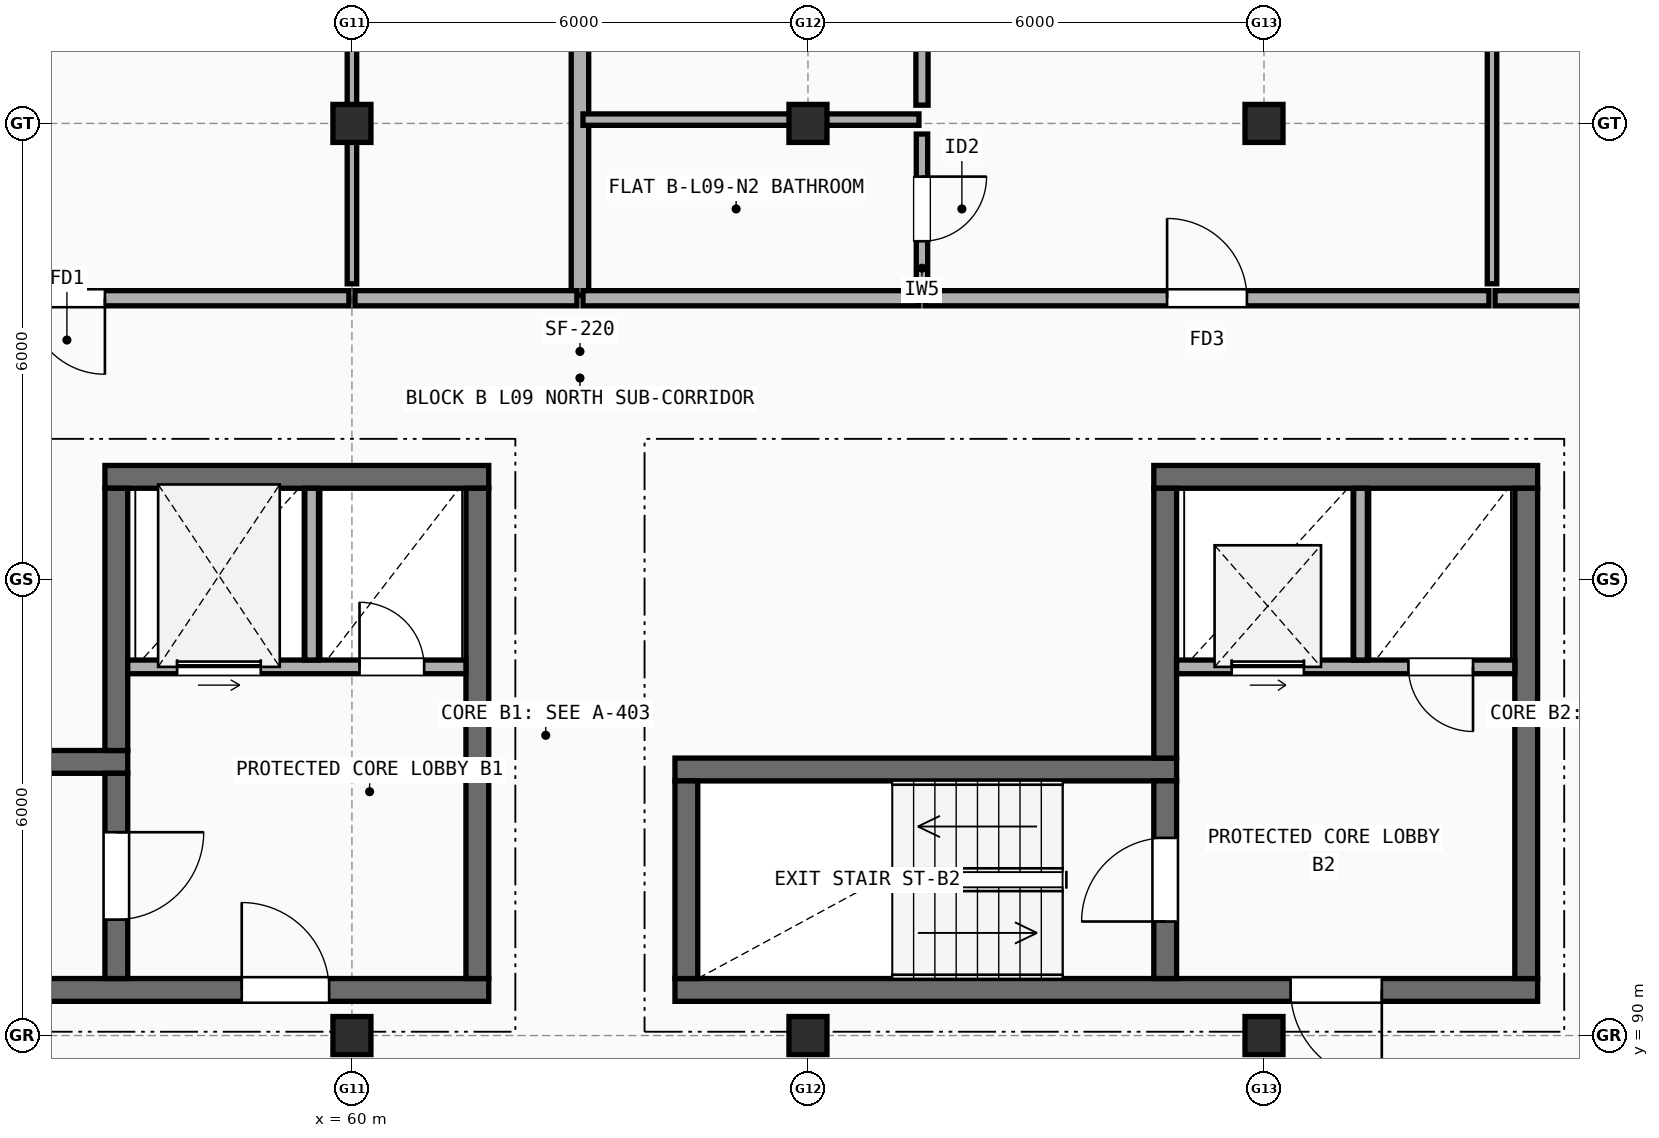
"""IFC4 building model, lengths in metres.
Left out: names, types, materials, properties, quantities, classifications, styles, units other than length and angle.
Written with IfcOpenShell. Run it as: python <this file> out.ifc"""

import sys

from ifc_helpers import new_model, si_unit, direction, frame, frame_2d, origin, origin_2d, place, context, subcontext, project, spatial, rectangle, extrude, element, fill, save


model = new_model("IFC4")
c1 = context("Model", 3, precision=1e-05, world=origin(), true_north=direction((0.0, 1.0)))
c2 = subcontext(c1, "Body", "Model", "MODEL_VIEW")
j1 = project(units=[si_unit("LENGTHUNIT", "METRE"), si_unit("PLANEANGLEUNIT", "RADIAN")], contexts=[c1])
p1 = place(None, origin())
s1 = spatial("IfcSite", under=j1, at=p1, CompositionType="ELEMENT")
p2 = place(p1, origin())
s2 = spatial("IfcBuilding", under=s1, at=p2, CompositionType="ELEMENT")
p3 = place(p2, frame((0.0, 0.0, 30.1)))
s3 = spatial("IfcBuildingStorey", under=s2, at=p3, CompositionType="ELEMENT", Elevation=30.1)
for number, where, z_axis, x_axis in (
    (1, (60.0, 90.0, 0.0), (0.0, 0.0, 1.0), (1.0, 0.0, 0.0)),
    (2, (60.0, 102.0, 0.0), (0.0, 0.0, 1.0), (1.0, 0.0, 0.0)),
    (3, (66.0, 90.0, 0.0), (0.0, 0.0, 1.0), (1.0, 0.0, 0.0)),
    (4, (66.0, 102.0, 0.0), (0.0, 0.0, 1.0), (1.0, 0.0, 0.0)),
    (5, (72.0, 90.0, 0.0), (0.0, 0.0, 1.0), (1.0, 0.0, 0.0)),
    (6, (72.0, 102.0, 0.0), (0.0, 0.0, 1.0), (1.0, 0.0, 0.0)),
):
    element("IfcColumn", number, at=place(p3, frame(where, z_axis=z_axis, x_axis=x_axis)), inside=s3, PredefinedType="COLUMN", context=c2, shape_type="SweptSolid", body=[
        extrude(rectangle(XDim=0.5, YDim=0.5, at=origin_2d()), origin(), (0.0, 0.0, 1.0), 2.985),
    ])
p4 = place(p3, frame((50.45, 90.6, 0.0), z_axis=(0.0, 0.0, 1.0), x_axis=(1.0, 0.0, 0.0)))
e7 = element("IfcWall", 7, at=p4, inside=s3, PredefinedType="SHEAR", context=c2, shape_type="SweptSolid", body=[
    extrude(rectangle(XDim=11.35, YDim=0.3, at=frame_2d((5.675, 0.0))), origin(), (0.0, 0.0, 1.0), 2.985),
])
p5 = place(p4, frame((8.1, 0.0, 0.0)))
e8 = element("IfcOpeningElement", 8, at=p5, cuts=e7, PredefinedType="OPENING", context=c2, shape_type="SweptSolid", body=[
    extrude(rectangle(XDim=1.15, YDim=2.15, at=frame_2d((0.575, 1.075))), frame((0.0, 0.16, 0.0), z_axis=(0.0, -1.0, 0.0), x_axis=(1.0, 0.0, 0.0)), (0.0, 0.0, 1.0), 0.32),
])
p6 = place(p3, frame((57.05, 93.6, 0.0), z_axis=(0.0, 0.0, 1.0), x_axis=(-1.0, 0.0, 0.0)))
e9 = element("IfcWall", 9, at=p6, inside=s3, PredefinedType="SHEAR", context=c2, shape_type="SweptSolid", body=[
    extrude(rectangle(XDim=6.6, YDim=0.3, at=frame_2d((3.3, 0.0))), origin(), (0.0, 0.0, 1.0), 2.985),
])
p7 = place(p3, frame((56.9, 90.75, 0.0), z_axis=(0.0, 0.0, 1.0), x_axis=(0.0, 1.0, 0.0)))
e10 = element("IfcWall", 10, at=p7, inside=s3, PredefinedType="SHEAR", context=c2, shape_type="SweptSolid", body=[
    extrude(rectangle(XDim=2.7, YDim=0.3, at=frame_2d((1.35, 0.0))), origin(), (0.0, 0.0, 1.0), 2.985),
])
p8 = place(p7, frame((0.775, 0.0, 0.0)))
e11 = element("IfcOpeningElement", 11, at=p8, cuts=e10, PredefinedType="OPENING", context=c2, shape_type="SweptSolid", body=[
    extrude(rectangle(XDim=1.15, YDim=2.15, at=frame_2d((0.575, 1.075))), frame((0.0, 0.16, 0.0), z_axis=(0.0, -1.0, 0.0), x_axis=(1.0, 0.0, 0.0)), (0.0, 0.0, 1.0), 0.32),
])
p9 = place(p3, frame((61.8, 97.35, 0.0), z_axis=(0.0, 0.0, 1.0), x_axis=(-1.0, 0.0, 0.0)))
e12 = element("IfcWall", 12, at=p9, inside=s3, PredefinedType="SHEAR", context=c2, shape_type="SweptSolid", body=[
    extrude(rectangle(XDim=5.05, YDim=0.3, at=frame_2d((2.525, 0.0))), origin(), (0.0, 0.0, 1.0), 2.985),
])
p10 = place(p3, frame((61.65, 90.75, 0.0), z_axis=(0.0, 0.0, 1.0), x_axis=(0.0, 1.0, 0.0)))
e13 = element("IfcWall", 13, at=p10, inside=s3, PredefinedType="SHEAR", context=c2, shape_type="SweptSolid", body=[
    extrude(rectangle(XDim=6.45, YDim=0.3, at=frame_2d((3.225, 0.0))), origin(), (0.0, 0.0, 1.0), 2.985),
])
p11 = place(p3, frame((56.9, 93.75, 0.0), z_axis=(0.0, 0.0, 1.0), x_axis=(0.0, 1.0, 0.0)))
e14 = element("IfcWall", 14, at=p11, inside=s3, PredefinedType="SHEAR", context=c2, shape_type="SweptSolid", body=[
    extrude(rectangle(XDim=3.45, YDim=0.3, at=frame_2d((1.725, 0.0))), origin(), (0.0, 0.0, 1.0), 2.985),
])
p12 = place(p3, frame((57.05, 94.85, 0.0), z_axis=(0.0, 0.0, 1.0), x_axis=(1.0, 0.0, 0.0)))
e15 = element("IfcWall", 15, at=p12, inside=s3, PredefinedType="SOLIDWALL", context=c2, shape_type="SweptSolid", body=[
    extrude(rectangle(XDim=4.45, YDim=0.18, at=frame_2d((2.225, 0.0))), origin(), (0.0, 0.0, 1.0), 2.985),
])
p13 = place(p12, frame((0.65, 0.0, 0.0)))
e16 = element("IfcOpeningElement", 16, at=p13, cuts=e15, PredefinedType="OPENING", context=c2, shape_type="SweptSolid", body=[
    extrude(rectangle(XDim=1.1, YDim=2.15, at=frame_2d((0.55, 1.075))), frame((0.0, 0.1, 0.0), z_axis=(0.0, -1.0, 0.0), x_axis=(1.0, 0.0, 0.0)), (0.0, 0.0, 1.0), 0.2),
])
p14 = place(p12, frame((3.05, 0.0, 0.0)))
e17 = element("IfcOpeningElement", 17, at=p14, cuts=e15, PredefinedType="OPENING", context=c2, shape_type="SweptSolid", body=[
    extrude(rectangle(XDim=0.85, YDim=2.1, at=frame_2d((0.425, 1.05))), frame((0.0, 0.1, 0.0), z_axis=(0.0, -1.0, 0.0), x_axis=(1.0, 0.0, 0.0)), (0.0, 0.0, 1.0), 0.2),
])
p15 = place(p3, frame((59.47, 94.94, 0.0), z_axis=(0.0, 0.0, 1.0), x_axis=(0.0, 1.0, 0.0)))
e18 = element("IfcWall", 18, at=p15, inside=s3, PredefinedType="SOLIDWALL", context=c2, shape_type="SweptSolid", body=[
    extrude(rectangle(XDim=2.26, YDim=0.18, at=frame_2d((1.13, 0.0))), origin(), (0.0, 0.0, 1.0), 2.985),
])
p16 = place(p3, frame((64.25, 90.6, 0.0), z_axis=(0.0, 0.0, 1.0), x_axis=(1.0, 0.0, 0.0)))
e19 = element("IfcWall", 19, at=p16, inside=s3, PredefinedType="SHEAR", context=c2, shape_type="SweptSolid", body=[
    extrude(rectangle(XDim=11.35, YDim=0.3, at=frame_2d((5.675, 0.0))), origin(), (0.0, 0.0, 1.0), 2.985),
])
p17 = place(p16, frame((8.1, 0.0, 0.0)))
e20 = element("IfcOpeningElement", 20, at=p17, cuts=e19, PredefinedType="OPENING", context=c2, shape_type="SweptSolid", body=[
    extrude(rectangle(XDim=1.2, YDim=2.15, at=frame_2d((0.6, 1.075))), frame((0.0, 0.16, 0.0), z_axis=(0.0, -1.0, 0.0), x_axis=(1.0, 0.0, 0.0)), (0.0, 0.0, 1.0), 0.32),
])
p18 = place(p3, frame((70.85, 93.5, 0.0), z_axis=(0.0, 0.0, 1.0), x_axis=(-1.0, 0.0, 0.0)))
e21 = element("IfcWall", 21, at=p18, inside=s3, PredefinedType="SHEAR", context=c2, shape_type="SweptSolid", body=[
    extrude(rectangle(XDim=6.6, YDim=0.3, at=frame_2d((3.3, 0.0))), origin(), (0.0, 0.0, 1.0), 2.985),
])
p19 = place(p3, frame((64.4, 93.35, 0.0), z_axis=(0.0, 0.0, 1.0), x_axis=(0.0, -1.0, 0.0)))
e22 = element("IfcWall", 22, at=p19, inside=s3, PredefinedType="SHEAR", context=c2, shape_type="SweptSolid", body=[
    extrude(rectangle(XDim=2.6, YDim=0.3, at=frame_2d((1.3, 0.0))), origin(), (0.0, 0.0, 1.0), 2.985),
])
p20 = place(p3, frame((70.7, 90.75, 0.0), z_axis=(0.0, 0.0, 1.0), x_axis=(0.0, 1.0, 0.0)))
e23 = element("IfcWall", 23, at=p20, inside=s3, PredefinedType="SHEAR", context=c2, shape_type="SweptSolid", body=[
    extrude(rectangle(XDim=2.6, YDim=0.3, at=frame_2d((1.3, 0.0))), origin(), (0.0, 0.0, 1.0), 2.985),
])
p21 = place(p20, frame((0.75, 0.0, 0.0)))
e24 = element("IfcOpeningElement", 24, at=p21, cuts=e23, PredefinedType="OPENING", context=c2, shape_type="SweptSolid", body=[
    extrude(rectangle(XDim=1.1, YDim=2.15, at=frame_2d((0.55, 1.075))), frame((0.0, 0.16, 0.0), z_axis=(0.0, -1.0, 0.0), x_axis=(1.0, 0.0, 0.0)), (0.0, 0.0, 1.0), 0.32),
])
p22 = place(p3, frame((75.6, 97.35, 0.0), z_axis=(0.0, 0.0, 1.0), x_axis=(-1.0, 0.0, 0.0)))
e25 = element("IfcWall", 25, at=p22, inside=s3, PredefinedType="SHEAR", context=c2, shape_type="SweptSolid", body=[
    extrude(rectangle(XDim=5.05, YDim=0.3, at=frame_2d((2.525, 0.0))), origin(), (0.0, 0.0, 1.0), 2.985),
])
p23 = place(p3, frame((75.45, 90.75, 0.0), z_axis=(0.0, 0.0, 1.0), x_axis=(0.0, 1.0, 0.0)))
e26 = element("IfcWall", 26, at=p23, inside=s3, PredefinedType="SHEAR", context=c2, shape_type="SweptSolid", body=[
    extrude(rectangle(XDim=6.45, YDim=0.3, at=frame_2d((3.225, 0.0))), origin(), (0.0, 0.0, 1.0), 2.985),
])
p24 = place(p3, frame((70.7, 93.65, 0.0), z_axis=(0.0, 0.0, 1.0), x_axis=(0.0, 1.0, 0.0)))
e27 = element("IfcWall", 27, at=p24, inside=s3, PredefinedType="SHEAR", context=c2, shape_type="SweptSolid", body=[
    extrude(rectangle(XDim=3.55, YDim=0.3, at=frame_2d((1.775, 0.0))), origin(), (0.0, 0.0, 1.0), 2.985),
])
p25 = place(p3, frame((70.85, 94.85, 0.0), z_axis=(0.0, 0.0, 1.0), x_axis=(1.0, 0.0, 0.0)))
e28 = element("IfcWall", 28, at=p25, inside=s3, PredefinedType="SOLIDWALL", context=c2, shape_type="SweptSolid", body=[
    extrude(rectangle(XDim=4.45, YDim=0.18, at=frame_2d((2.225, 0.0))), origin(), (0.0, 0.0, 1.0), 2.985),
])
p26 = place(p25, frame((0.725, 0.0, 0.0)))
e29 = element("IfcOpeningElement", 29, at=p26, cuts=e28, PredefinedType="OPENING", context=c2, shape_type="SweptSolid", body=[
    extrude(rectangle(XDim=0.95, YDim=2.15, at=frame_2d((0.475, 1.075))), frame((0.0, 0.1, 0.0), z_axis=(0.0, -1.0, 0.0), x_axis=(1.0, 0.0, 0.0)), (0.0, 0.0, 1.0), 0.2),
])
p27 = place(p25, frame((3.05, 0.0, 0.0)))
e30 = element("IfcOpeningElement", 30, at=p27, cuts=e28, PredefinedType="OPENING", context=c2, shape_type="SweptSolid", body=[
    extrude(rectangle(XDim=0.85, YDim=2.1, at=frame_2d((0.425, 1.05))), frame((0.0, 0.1, 0.0), z_axis=(0.0, -1.0, 0.0), x_axis=(1.0, 0.0, 0.0)), (0.0, 0.0, 1.0), 0.2),
])
p28 = place(p3, frame((73.27, 94.94, 0.0), z_axis=(0.0, 0.0, 1.0), x_axis=(0.0, 1.0, 0.0)))
e31 = element("IfcWall", 31, at=p28, inside=s3, PredefinedType="SOLIDWALL", context=c2, shape_type="SweptSolid", body=[
    extrude(rectangle(XDim=2.26, YDim=0.18, at=frame_2d((1.13, 0.0))), origin(), (0.0, 0.0, 1.0), 2.985),
])
p29 = place(p3, frame((63.0, 99.74, 0.0), z_axis=(0.0, 0.0, 1.0), x_axis=(0.0, 1.0, 0.0)))
e32 = element("IfcWall", 32, at=p29, inside=s3, PredefinedType="SOLIDWALL", context=c2, shape_type="SweptSolid", body=[
    extrude(rectangle(XDim=13.87, YDim=0.23, at=frame_2d((6.935, 0.0))), origin(), (0.0, 0.0, 1.0), 2.467),
])
p30 = place(p3, frame((52.54, 99.7, 0.0), z_axis=(0.0, 0.0, 1.0), x_axis=(1.0, 0.0, 0.0)))
e33 = element("IfcWall", 33, at=p30, inside=s3, PredefinedType="SOLIDWALL", context=c2, shape_type="SweptSolid", body=[
    extrude(rectangle(XDim=7.42, YDim=0.2, at=frame_2d((3.71, 0.0))), origin(), (0.0, 0.0, 1.0), 2.508),
])
p31 = place(p30, frame((3.21, 0.0, 0.0)))
e34 = element("IfcOpeningElement", 34, at=p31, cuts=e33, PredefinedType="OPENING", context=c2, shape_type="SweptSolid", body=[
    extrude(rectangle(XDim=1.0, YDim=2.15, at=frame_2d((0.5, 1.075))), frame((0.0, 0.11, 0.0), z_axis=(0.0, -1.0, 0.0), x_axis=(1.0, 0.0, 0.0)), (0.0, 0.0, 1.0), 0.22),
])
p32 = place(p3, frame((60.04, 99.7, 0.0), z_axis=(0.0, 0.0, 1.0), x_axis=(1.0, 0.0, 0.0)))
e35 = element("IfcWall", 35, at=p32, inside=s3, PredefinedType="SOLIDWALL", context=c2, shape_type="SweptSolid", body=[
    extrude(rectangle(XDim=2.92, YDim=0.2, at=frame_2d((1.46, 0.0))), origin(), (0.0, 0.0, 1.0), 2.508),
])
p33 = place(p3, frame((60.0, 99.89, 0.0), z_axis=(0.0, 0.0, 1.0), x_axis=(0.0, 1.0, 0.0)))
e36 = element("IfcWall", 36, at=p33, inside=s3, PredefinedType="PARTITIONING", context=c2, shape_type="SweptSolid", body=[
    extrude(rectangle(XDim=13.6, YDim=0.125, at=frame_2d((6.8, 0.0))), origin(), (0.0, 0.0, 1.0), 2.508),
])
p34 = place(p33, frame((6.65, 0.0, 0.0)))
e37 = element("IfcOpeningElement", 37, at=p34, cuts=e36, PredefinedType="OPENING", context=c2, shape_type="SweptSolid", body=[
    extrude(rectangle(XDim=0.9, YDim=2.1, at=frame_2d((0.45, 1.05))), frame((0.0, 0.073, 0.0), z_axis=(0.0, -1.0, 0.0), x_axis=(1.0, 0.0, 0.0)), (0.0, 0.0, 1.0), 0.145),
])
p35 = place(p3, frame((63.04, 99.7, 0.0), z_axis=(0.0, 0.0, 1.0), x_axis=(1.0, 0.0, 0.0)))
e38 = element("IfcWall", 38, at=p35, inside=s3, PredefinedType="SOLIDWALL", context=c2, shape_type="SweptSolid", body=[
    extrude(rectangle(XDim=4.42, YDim=0.2, at=frame_2d((2.21, 0.0))), origin(), (0.0, 0.0, 1.0), 2.985),
])
p36 = place(p3, frame((67.54, 99.7, 0.0), z_axis=(0.0, 0.0, 1.0), x_axis=(1.0, 0.0, 0.0)))
e39 = element("IfcWall", 39, at=p36, inside=s3, PredefinedType="SOLIDWALL", context=c2, shape_type="SweptSolid", body=[
    extrude(rectangle(XDim=7.42, YDim=0.2, at=frame_2d((3.71, 0.0))), origin(), (0.0, 0.0, 1.0), 2.985),
])
p37 = place(p36, frame((3.185, 0.0, 0.0)))
e40 = element("IfcOpeningElement", 40, at=p37, cuts=e39, PredefinedType="OPENING", context=c2, shape_type="SweptSolid", body=[
    extrude(rectangle(XDim=1.05, YDim=2.15, at=frame_2d((0.525, 1.075))), frame((0.0, 0.11, 0.0), z_axis=(0.0, -1.0, 0.0), x_axis=(1.0, 0.0, 0.0)), (0.0, 0.0, 1.0), 0.22),
])
p38 = place(p3, frame((67.5, 102.24, 0.0), z_axis=(0.0, 0.0, 1.0), x_axis=(0.0, 1.0, 0.0)))
e41 = element("IfcWall", 41, at=p38, inside=s3, PredefinedType="PLUMBINGWALL", context=c2, shape_type="SweptSolid", body=[
    extrude(rectangle(XDim=7.37, YDim=0.16, at=frame_2d((3.685, 0.0))), origin(), (0.0, 0.0, 1.0), 2.467),
])
p39 = place(p38, frame((3.245, 0.0, 0.0)))
e42 = element("IfcOpeningElement", 42, at=p39, cuts=e41, PredefinedType="OPENING", context=c2, shape_type="SweptSolid", body=[
    extrude(rectangle(XDim=0.88, YDim=2.1, at=frame_2d((0.44, 1.05))), frame((0.0, 0.09, 0.0), z_axis=(0.0, -1.0, 0.0), x_axis=(1.0, 0.0, 0.0)), (0.0, 0.0, 1.0), 0.18),
])
p40 = place(p3, frame((67.5, 99.89, 0.0), z_axis=(0.0, 0.0, 1.0), x_axis=(0.0, 1.0, 0.0)))
e43 = element("IfcWall", 43, at=p40, inside=s3, PredefinedType="PARTITIONING", context=c2, shape_type="SweptSolid", body=[
    extrude(rectangle(XDim=1.97, YDim=0.15, at=frame_2d((0.985, 0.0))), origin(), (0.0, 0.0, 1.0), 2.985),
])
p41 = place(p40, frame((0.56, 0.0, 0.0)))
e44 = element("IfcOpeningElement", 44, at=p41, cuts=e43, PredefinedType="OPENING", context=c2, shape_type="SweptSolid", body=[
    extrude(rectangle(XDim=0.85, YDim=2.1, at=frame_2d((0.425, 1.05))), frame((0.0, 0.085, 0.0), z_axis=(0.0, -1.0, 0.0), x_axis=(1.0, 0.0, 0.0)), (0.0, 0.0, 1.0), 0.17),
])
p42 = place(p3, frame((63.04, 102.05, 0.0), z_axis=(0.0, 0.0, 1.0), x_axis=(1.0, 0.0, 0.0)))
e45 = element("IfcWall", 45, at=p42, inside=s3, PredefinedType="PARTITIONING", context=c2, shape_type="SweptSolid", body=[
    extrude(rectangle(XDim=4.42, YDim=0.15, at=frame_2d((2.21, 0.0))), origin(), (0.0, 0.0, 1.0), 2.467),
])
p43 = place(p3, frame((75.04, 99.7, 0.0), z_axis=(0.0, 0.0, 1.0), x_axis=(1.0, 0.0, 0.0)))
e46 = element("IfcWall", 46, at=p43, inside=s3, PredefinedType="SOLIDWALL", context=c2, shape_type="SweptSolid", body=[
    extrude(rectangle(XDim=2.92, YDim=0.2, at=frame_2d((1.46, 0.0))), origin(), (0.0, 0.0, 1.0), 2.467),
])
p44 = place(p3, frame((75.0, 99.89, 0.0), z_axis=(0.0, 0.0, 1.0), x_axis=(0.0, 1.0, 0.0)))
e47 = element("IfcWall", 47, at=p44, inside=s3, PredefinedType="PARTITIONING", context=c2, shape_type="SweptSolid", body=[
    extrude(rectangle(XDim=13.92, YDim=0.125, at=frame_2d((6.96, 0.0))), origin(), (0.0, 0.0, 1.0), 2.467),
])
p45 = place(p44, frame((6.65, 0.0, 0.0)))
e48 = element("IfcOpeningElement", 48, at=p45, cuts=e47, PredefinedType="OPENING", context=c2, shape_type="SweptSolid", body=[
    extrude(rectangle(XDim=0.88, YDim=2.1, at=frame_2d((0.44, 1.05))), frame((0.0, 0.073, 0.0), z_axis=(0.0, -1.0, 0.0), x_axis=(1.0, 0.0, 0.0)), (0.0, 0.0, 1.0), 0.145),
])
p46 = place(p5, origin())
e49 = element("IfcDoor", 49, at=p46, inside=s3, OperationType="SINGLE_SWING_LEFT", PredefinedType="DOOR", context=c2, shape_type="SweptSolid", body=[
    extrude(rectangle(XDim=1.15, YDim=2.15, at=frame_2d((0.575, 1.075))), frame((0.0, 0.025, 0.0), z_axis=(0.0, -1.0, 0.0), x_axis=(1.0, 0.0, 0.0)), (0.0, 0.0, 1.0), 0.05),
])
fill(e8, e49)
p47 = place(p8, origin())
e50 = element("IfcDoor", 50, at=p47, inside=s3, OperationType="SINGLE_SWING_RIGHT", PredefinedType="DOOR", context=c2, shape_type="SweptSolid", body=[
    extrude(rectangle(XDim=1.15, YDim=2.15, at=frame_2d((0.575, 1.075))), frame((0.0, 0.025, 0.0), z_axis=(0.0, -1.0, 0.0), x_axis=(1.0, 0.0, 0.0)), (0.0, 0.0, 1.0), 0.05),
])
fill(e11, e50)
p48 = place(p13, origin())
e51 = element("IfcDoor", 51, at=p48, inside=s3, OperationType="SLIDING_TO_LEFT", PredefinedType="DOOR", context=c2, shape_type="SweptSolid", body=[
    extrude(rectangle(XDim=1.1, YDim=2.15, at=frame_2d((0.55, 1.075))), frame((0.0, 0.025, 0.0), z_axis=(0.0, -1.0, 0.0), x_axis=(1.0, 0.0, 0.0)), (0.0, 0.0, 1.0), 0.05),
])
fill(e16, e51)
p49 = place(p14, frame((0.85, 0.0, 0.0), z_axis=(0.0, 0.0, 1.0), x_axis=(-1.0, 0.0, 0.0)))
e52 = element("IfcDoor", 52, at=p49, inside=s3, OperationType="SINGLE_SWING_LEFT", PredefinedType="DOOR", context=c2, shape_type="SweptSolid", body=[
    extrude(rectangle(XDim=0.85, YDim=2.1, at=frame_2d((0.425, 1.05))), frame((0.0, 0.025, 0.0), z_axis=(0.0, -1.0, 0.0), x_axis=(1.0, 0.0, 0.0)), (0.0, 0.0, 1.0), 0.05),
])
fill(e17, e52)
p50 = place(p17, origin())
e53 = element("IfcDoor", 53, at=p50, inside=s3, OperationType="SINGLE_SWING_RIGHT", PredefinedType="DOOR", context=c2, shape_type="SweptSolid", body=[
    extrude(rectangle(XDim=1.2, YDim=2.15, at=frame_2d((0.6, 1.075))), frame((0.0, 0.025, 0.0), z_axis=(0.0, -1.0, 0.0), x_axis=(1.0, 0.0, 0.0)), (0.0, 0.0, 1.0), 0.05),
])
fill(e20, e53)
p51 = place(p21, origin())
e54 = element("IfcDoor", 54, at=p51, inside=s3, OperationType="SINGLE_SWING_LEFT", PredefinedType="DOOR", context=c2, shape_type="SweptSolid", body=[
    extrude(rectangle(XDim=1.1, YDim=2.15, at=frame_2d((0.55, 1.075))), frame((0.0, 0.025, 0.0), z_axis=(0.0, -1.0, 0.0), x_axis=(1.0, 0.0, 0.0)), (0.0, 0.0, 1.0), 0.05),
])
fill(e24, e54)
p52 = place(p26, origin())
e55 = element("IfcDoor", 55, at=p52, inside=s3, OperationType="SLIDING_TO_LEFT", PredefinedType="DOOR", context=c2, shape_type="SweptSolid", body=[
    extrude(rectangle(XDim=0.95, YDim=2.15, at=frame_2d((0.475, 1.075))), frame((0.0, 0.025, 0.0), z_axis=(0.0, -1.0, 0.0), x_axis=(1.0, 0.0, 0.0)), (0.0, 0.0, 1.0), 0.05),
])
fill(e29, e55)
p53 = place(p27, frame((0.85, 0.0, 0.0), z_axis=(0.0, 0.0, 1.0), x_axis=(-1.0, 0.0, 0.0)))
e56 = element("IfcDoor", 56, at=p53, inside=s3, OperationType="SINGLE_SWING_RIGHT", PredefinedType="DOOR", context=c2, shape_type="SweptSolid", body=[
    extrude(rectangle(XDim=0.85, YDim=2.1, at=frame_2d((0.425, 1.05))), frame((0.0, 0.025, 0.0), z_axis=(0.0, -1.0, 0.0), x_axis=(1.0, 0.0, 0.0)), (0.0, 0.0, 1.0), 0.05),
])
fill(e30, e56)
p54 = place(p31, origin())
e57 = element("IfcDoor", 57, at=p54, inside=s3, OperationType="SINGLE_SWING_RIGHT", PredefinedType="DOOR", context=c2, shape_type="SweptSolid", body=[
    extrude(rectangle(XDim=1.0, YDim=2.15, at=frame_2d((0.5, 1.075))), frame((0.0, 0.025, 0.0), z_axis=(0.0, -1.0, 0.0), x_axis=(1.0, 0.0, 0.0)), (0.0, 0.0, 1.0), 0.05),
])
fill(e34, e57)
p55 = place(p37, origin())
e58 = element("IfcDoor", 58, at=p55, inside=s3, OperationType="SINGLE_SWING_LEFT", PredefinedType="DOOR", context=c2, shape_type="SweptSolid", body=[
    extrude(rectangle(XDim=1.05, YDim=2.15, at=frame_2d((0.525, 1.075))), frame((0.0, 0.025, 0.0), z_axis=(0.0, -1.0, 0.0), x_axis=(1.0, 0.0, 0.0)), (0.0, 0.0, 1.0), 0.05),
])
fill(e40, e58)
p56 = place(p41, origin())
e59 = element("IfcDoor", 59, at=p56, inside=s3, OperationType="SINGLE_SWING_RIGHT", PredefinedType="DOOR", context=c2, shape_type="SweptSolid", body=[
    extrude(rectangle(XDim=0.85, YDim=2.1, at=frame_2d((0.425, 1.05))), frame((0.0, 0.025, 0.0), z_axis=(0.0, -1.0, 0.0), x_axis=(1.0, 0.0, 0.0)), (0.0, 0.0, 1.0), 0.05),
])
fill(e44, e59)
save(model, sys.argv[1])
